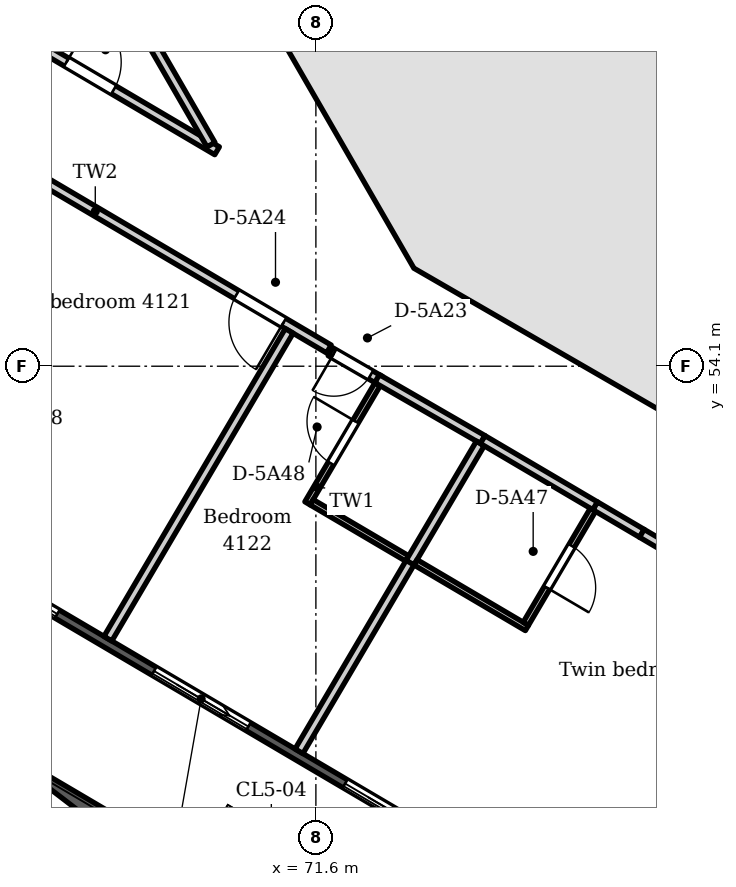
"""IFC4 building model, lengths in metres.
Left out: names, types, materials, properties, quantities, classifications, styles, units other than length and angle.
Written with IfcOpenShell. Run it as: python <this file> out.ifc"""

import sys

from ifc_helpers import new_model, si_unit, direction, frame, frame_2d, origin, place, context, subcontext, project, spatial, polyline, rectangle, outline, extrude, element, fill, save


model = new_model("IFC4")
c1 = context("Model", 3, precision=1e-05, world=origin(), true_north=direction((0.0, 1.0)))
c2 = subcontext(c1, "Body", "Model", "MODEL_VIEW")
j1 = project(units=[si_unit("LENGTHUNIT", "METRE"), si_unit("PLANEANGLEUNIT", "RADIAN")], contexts=[c1])
p1 = place(None, origin())
s1 = spatial("IfcSite", under=j1, at=p1, CompositionType="ELEMENT")
p2 = place(p1, origin())
s2 = spatial("IfcBuilding", under=s1, at=p2, CompositionType="ELEMENT")
p3 = place(p2, frame((0.0, 0.0, 161.1)))
s3 = spatial("IfcBuildingStorey", under=s2, at=p3, CompositionType="ELEMENT", Elevation=161.1)
p4 = place(p3, frame((71.117, 60.24, 0.0), z_axis=(0.0, 0.0, 1.0), x_axis=(0.500038571144, -0.866003133579, 0.0)))
e1 = element("IfcWall", 1, at=p4, inside=s3, PredefinedType="SHEAR", context=c2, shape_type="SweptSolid", body=[
    extrude(outline(polyline([(0.0, -0.45), (4.969, -0.45), (4.728, 0.45), (0.241, 0.45), (0.0, -0.45)])), origin(), (0.0, 0.0, 1.0), 3.6),
])
p5 = place(p4, frame((1.785, 0.0, 0.0)))
e2 = element("IfcOpeningElement", 2, at=p5, cuts=e1, PredefinedType="OPENING", context=c2, shape_type="SweptSolid", body=[
    extrude(rectangle(XDim=1.4, YDim=2.1, at=frame_2d((0.7, 1.05))), frame((0.0, 0.46, 0.0), z_axis=(0.0, -1.0, 0.0), x_axis=(1.0, 0.0, 0.0)), (0.0, 0.0, 1.0), 0.92),
])
p6 = place(p3, frame((73.437, 56.102, 0.0), z_axis=(0.0, 0.0, 1.0), x_axis=(0.866003133579, -0.500038571144, 0.0)))
e3 = element("IfcWall", 3, at=p6, inside=s3, PredefinedType="SHEAR", context=c2, shape_type="SweptSolid", body=[
    extrude(outline(polyline([(0.0, -0.45), (4.969, -0.45), (4.728, 0.45), (0.241, 0.45), (0.0, -0.45)])), origin(), (0.0, 0.0, 1.0), 3.6),
])
p7 = place(p6, frame((0.896, 0.0, 0.0)))
e4 = element("IfcOpeningElement", 4, at=p7, cuts=e3, PredefinedType="OPENING", context=c2, shape_type="SweptSolid", body=[
    extrude(rectangle(XDim=0.9, YDim=2.1, at=frame_2d((0.45, 1.05))), frame((0.0, 0.46, 0.0), z_axis=(0.0, -1.0, 0.0), x_axis=(1.0, 0.0, 0.0)), (0.0, 0.0, 1.0), 0.92),
])
p8 = place(p6, frame((3.185, 0.0, 0.0)))
e5 = element("IfcOpeningElement", 5, at=p8, cuts=e3, PredefinedType="OPENING", context=c2, shape_type="SweptSolid", body=[
    extrude(rectangle(XDim=0.9, YDim=2.1, at=frame_2d((0.45, 1.05))), frame((0.0, 0.46, 0.0), z_axis=(0.0, -1.0, 0.0), x_axis=(1.0, 0.0, 0.0)), (0.0, 0.0, 1.0), 0.92),
])
p9 = place(p3, frame((80.354, 60.886, 0.0), z_axis=(0.0, 0.0, 1.0), x_axis=(-0.866047706748, -0.499961368145, 0.0)))
e6 = element("IfcWall", 6, at=p9, inside=s3, PredefinedType="SHEAR", context=c2, shape_type="SweptSolid", body=[
    extrude(rectangle(XDim=7.873, YDim=0.3, at=frame_2d((3.936, 0.0))), origin(), (0.0, 0.0, 1.0), 3.6),
])
p10 = place(p3, frame((90.139, 36.597, 0.0), z_axis=(0.0, 0.0, 1.0), x_axis=(-0.861630336939, 0.507536365659, 0.0)))
e7 = element("IfcWall", 7, at=p10, inside=s3, PredefinedType="SOLIDWALL", context=c2, shape_type="SweptSolid", body=[
    extrude(outline(polyline([(0.149, 0.075), (0.149, -0.075), (43.617, -0.075), (43.617, 0.075), (0.149, 0.075)])), origin(), (0.0, 0.0, 1.0), 3.3),
])
p11 = place(p10, frame((1.224, 0.0, 0.0)))
e8 = element("IfcOpeningElement", 8, at=p11, cuts=e7, PredefinedType="OPENING", context=c2, shape_type="SweptSolid", body=[
    extrude(rectangle(XDim=1.8, YDim=2.6, at=frame_2d((0.9, 1.3))), frame((0.0, 0.085, 0.0), z_axis=(0.0, -1.0, 0.0), x_axis=(1.0, 0.0, 0.0)), (0.0, 0.0, 1.0), 0.17),
])
p12 = place(p10, frame((4.571, 0.0, 0.0)))
e9 = element("IfcOpeningElement", 9, at=p12, cuts=e7, PredefinedType="OPENING", context=c2, shape_type="SweptSolid", body=[
    extrude(rectangle(XDim=1.8, YDim=2.6, at=frame_2d((0.9, 1.3))), frame((0.0, 0.085, 0.0), z_axis=(0.0, -1.0, 0.0), x_axis=(1.0, 0.0, 0.0)), (0.0, 0.0, 1.0), 0.17),
])
p13 = place(p10, frame((8.218, 0.0, 0.0)))
e10 = element("IfcOpeningElement", 10, at=p13, cuts=e7, PredefinedType="OPENING", context=c2, shape_type="SweptSolid", body=[
    extrude(rectangle(XDim=1.8, YDim=2.6, at=frame_2d((0.9, 1.3))), frame((0.0, 0.085, 0.0), z_axis=(0.0, -1.0, 0.0), x_axis=(1.0, 0.0, 0.0)), (0.0, 0.0, 1.0), 0.17),
])
p14 = place(p10, frame((11.865, 0.0, 0.0)))
e11 = element("IfcOpeningElement", 11, at=p14, cuts=e7, PredefinedType="OPENING", context=c2, shape_type="SweptSolid", body=[
    extrude(rectangle(XDim=1.8, YDim=2.6, at=frame_2d((0.9, 1.3))), frame((0.0, 0.085, 0.0), z_axis=(0.0, -1.0, 0.0), x_axis=(1.0, 0.0, 0.0)), (0.0, 0.0, 1.0), 0.17),
])
p15 = place(p10, frame((15.512, 0.0, 0.0)))
e12 = element("IfcOpeningElement", 12, at=p15, cuts=e7, PredefinedType="OPENING", context=c2, shape_type="SweptSolid", body=[
    extrude(rectangle(XDim=1.8, YDim=2.6, at=frame_2d((0.9, 1.3))), frame((0.0, 0.085, 0.0), z_axis=(0.0, -1.0, 0.0), x_axis=(1.0, 0.0, 0.0)), (0.0, 0.0, 1.0), 0.17),
])
p16 = place(p10, frame((19.16, 0.0, 0.0)))
e13 = element("IfcOpeningElement", 13, at=p16, cuts=e7, PredefinedType="OPENING", context=c2, shape_type="SweptSolid", body=[
    extrude(rectangle(XDim=1.8, YDim=2.6, at=frame_2d((0.9, 1.3))), frame((0.0, 0.085, 0.0), z_axis=(0.0, -1.0, 0.0), x_axis=(1.0, 0.0, 0.0)), (0.0, 0.0, 1.0), 0.17),
])
p17 = place(p10, frame((22.807, 0.0, 0.0)))
e14 = element("IfcOpeningElement", 14, at=p17, cuts=e7, PredefinedType="OPENING", context=c2, shape_type="SweptSolid", body=[
    extrude(rectangle(XDim=1.8, YDim=2.6, at=frame_2d((0.9, 1.3))), frame((0.0, 0.085, 0.0), z_axis=(0.0, -1.0, 0.0), x_axis=(1.0, 0.0, 0.0)), (0.0, 0.0, 1.0), 0.17),
])
p18 = place(p10, frame((26.454, 0.0, 0.0)))
e15 = element("IfcOpeningElement", 15, at=p18, cuts=e7, PredefinedType="OPENING", context=c2, shape_type="SweptSolid", body=[
    extrude(rectangle(XDim=1.8, YDim=2.6, at=frame_2d((0.9, 1.3))), frame((0.0, 0.085, 0.0), z_axis=(0.0, -1.0, 0.0), x_axis=(1.0, 0.0, 0.0)), (0.0, 0.0, 1.0), 0.17),
])
p19 = place(p10, frame((30.101, 0.0, 0.0)))
e16 = element("IfcOpeningElement", 16, at=p19, cuts=e7, PredefinedType="OPENING", context=c2, shape_type="SweptSolid", body=[
    extrude(rectangle(XDim=1.8, YDim=2.6, at=frame_2d((0.9, 1.3))), frame((0.0, 0.085, 0.0), z_axis=(0.0, -1.0, 0.0), x_axis=(1.0, 0.0, 0.0)), (0.0, 0.0, 1.0), 0.17),
])
p20 = place(p10, frame((33.748, 0.0, 0.0)))
e17 = element("IfcOpeningElement", 17, at=p20, cuts=e7, PredefinedType="OPENING", context=c2, shape_type="SweptSolid", body=[
    extrude(rectangle(XDim=1.8, YDim=2.6, at=frame_2d((0.9, 1.3))), frame((0.0, 0.085, 0.0), z_axis=(0.0, -1.0, 0.0), x_axis=(1.0, 0.0, 0.0)), (0.0, 0.0, 1.0), 0.17),
])
p21 = place(p10, frame((37.396, 0.0, 0.0)))
e18 = element("IfcOpeningElement", 18, at=p21, cuts=e7, PredefinedType="OPENING", context=c2, shape_type="SweptSolid", body=[
    extrude(rectangle(XDim=1.8, YDim=2.6, at=frame_2d((0.9, 1.3))), frame((0.0, 0.085, 0.0), z_axis=(0.0, -1.0, 0.0), x_axis=(1.0, 0.0, 0.0)), (0.0, 0.0, 1.0), 0.17),
])
p22 = place(p10, frame((40.743, 0.0, 0.0)))
e19 = element("IfcOpeningElement", 19, at=p22, cuts=e7, PredefinedType="OPENING", context=c2, shape_type="SweptSolid", body=[
    extrude(rectangle(XDim=1.8, YDim=2.6, at=frame_2d((0.9, 1.3))), frame((0.0, 0.085, 0.0), z_axis=(0.0, -1.0, 0.0), x_axis=(1.0, 0.0, 0.0)), (0.0, 0.0, 1.0), 0.17),
])
p23 = place(p3, origin())
e20 = element("IfcWall", 20, at=p23, inside=s3, PredefinedType="PARAPET", context=c2, shape_type="SweptSolid", body=[
    extrude(outline(polyline([(66.115, 48.004), (89.775, 29.849), (89.82, 30.192), (68.236, 46.754), (66.115, 48.004)])), origin(), (0.0, 0.0, 1.0), 1.1),
])
p24 = place(p3, frame((65.779, 57.938, 0.0), z_axis=(0.0, 0.0, 1.0), x_axis=(0.861623120435, -0.507548616718, 0.0)))
e21 = element("IfcWall", 21, at=p24, inside=s3, PredefinedType="PARTITIONING", context=c2, shape_type="SweptSolid", body=[
    extrude(rectangle(XDim=7.004, YDim=0.15, at=frame_2d((3.502, 0.0))), origin(), (0.0, 0.0, 1.0), 3.3),
])
p25 = place(p24, frame((5.24, 0.0, 0.0)))
e22 = element("IfcOpeningElement", 22, at=p25, cuts=e21, PredefinedType="OPENING", context=c2, shape_type="SweptSolid", body=[
    extrude(rectangle(XDim=0.9, YDim=2.1, at=frame_2d((0.45, 1.05))), frame((0.0, 0.085, 0.0), z_axis=(0.0, -1.0, 0.0), x_axis=(1.0, 0.0, 0.0)), (0.0, 0.0, 1.0), 0.17),
])
p26 = place(p3, frame((65.863, 60.065, 0.0), z_axis=(0.0, 0.0, 1.0), x_axis=(0.861635540959, -0.507527530835, 0.0)))
e23 = element("IfcWall", 23, at=p26, inside=s3, PredefinedType="PARTITIONING", context=c2, shape_type="SweptSolid", body=[
    extrude(rectangle(XDim=4.772, YDim=0.15, at=frame_2d((2.386, 0.0))), origin(), (0.0, 0.0, 1.0), 3.3),
])
p27 = place(p26, frame((1.899, 0.0, 0.0)))
e24 = element("IfcOpeningElement", 24, at=p27, cuts=e23, PredefinedType="OPENING", context=c2, shape_type="SweptSolid", body=[
    extrude(rectangle(XDim=0.9, YDim=2.1, at=frame_2d((0.45, 1.05))), frame((0.0, 0.085, 0.0), z_axis=(0.0, -1.0, 0.0), x_axis=(1.0, 0.0, 0.0)), (0.0, 0.0, 1.0), 0.17),
])
p28 = place(p3, frame((68.179, 49.619, 0.0), z_axis=(0.0, 0.0, 1.0), x_axis=(0.507603061138, 0.861591047031, 0.0)))
e25 = element("IfcWall", 25, at=p28, inside=s3, PredefinedType="PARTITIONING", context=c2, shape_type="SweptSolid", body=[
    extrude(rectangle(XDim=5.874, YDim=0.15, at=frame_2d((2.937, 0.0))), origin(), (0.0, 0.0, 1.0), 3.3),
])
p29 = place(p3, frame((68.889, 59.448, 0.0), z_axis=(0.0, 0.0, 1.0), x_axis=(0.500259007655, -0.865875813994, 0.0)))
e26 = element("IfcWall", 26, at=p29, inside=s3, PredefinedType="PARTITIONING", context=c2, shape_type="SweptSolid", body=[
    extrude(rectangle(XDim=1.969, YDim=0.15, at=frame_2d((0.985, 0.0))), origin(), (0.0, 0.0, 1.0), 3.3),
])
p30 = place(p3, frame((71.322, 47.769, 0.0), z_axis=(0.0, 0.0, 1.0), x_axis=(0.507419363551, 0.861699245383, 0.0)))
e27 = element("IfcWall", 27, at=p30, inside=s3, PredefinedType="PARTITIONING", context=c2, shape_type="SweptSolid", body=[
    extrude(rectangle(XDim=3.688, YDim=0.15, at=frame_2d((1.844, 0.0))), origin(), (0.0, 0.0, 1.0), 3.3),
])
p31 = place(p3, frame((71.462, 51.846, 0.0), z_axis=(0.0, 0.0, 1.0), x_axis=(0.507433164297, 0.861691118541, 0.0)))
e28 = element("IfcWall", 28, at=p31, inside=s3, PredefinedType="PARTITIONING", context=c2, shape_type="SweptSolid", body=[
    extrude(rectangle(XDim=2.273, YDim=0.1, at=frame_2d((1.136, 0.0))), origin(), (0.0, 0.0, 1.0), 3.3),
])
p32 = place(p31, frame((0.761, 0.0, 0.0)))
e29 = element("IfcOpeningElement", 29, at=p32, cuts=e28, PredefinedType="OPENING", context=c2, shape_type="SweptSolid", body=[
    extrude(rectangle(XDim=0.8, YDim=2.1, at=frame_2d((0.4, 1.05))), frame((0.0, 0.06, 0.0), z_axis=(0.0, -1.0, 0.0), x_axis=(1.0, 0.0, 0.0)), (0.0, 0.0, 1.0), 0.12),
])
p33 = place(p3, frame((71.53, 51.864, 0.0), z_axis=(0.0, 0.0, 1.0), x_axis=(0.861772491813, -0.507294955972, 0.0)))
e30 = element("IfcWall", 30, at=p33, inside=s3, PredefinedType="PARTITIONING", context=c2, shape_type="SweptSolid", body=[
    extrude(rectangle(XDim=1.824, YDim=0.1, at=frame_2d((0.912, 0.0))), origin(), (0.0, 0.0, 1.0), 3.3),
])
p34 = place(p3, frame((71.839, 54.339, 0.0), z_axis=(0.0, 0.0, 1.0), x_axis=(0.865780375256, -0.500424161908, 0.0)))
e31 = element("IfcWall", 31, at=p34, inside=s3, PredefinedType="PARTITIONING", context=c2, shape_type="SweptSolid", body=[
    extrude(rectangle(XDim=0.944, YDim=0.15, at=frame_2d((0.472, 0.0))), origin(), (0.0, 0.0, 1.0), 3.3),
])
p35 = place(p34, frame((0.064, 0.0, 0.0)))
e32 = element("IfcOpeningElement", 32, at=p35, cuts=e31, PredefinedType="OPENING", context=c2, shape_type="SweptSolid", body=[
    extrude(rectangle(XDim=0.7, YDim=2.1, at=frame_2d((0.35, 1.05))), frame((0.0, 0.085, 0.0), z_axis=(0.0, -1.0, 0.0), x_axis=(1.0, 0.0, 0.0)), (0.0, 0.0, 1.0), 0.17),
])
p36 = place(p3, frame((72.607, 53.896, 0.0), z_axis=(0.0, 0.0, 1.0), x_axis=(0.866136921896, -0.4998067952, 0.0)))
e33 = element("IfcWall", 33, at=p36, inside=s3, PredefinedType="PARTITIONING", context=c2, shape_type="SweptSolid", body=[
    extrude(rectangle(XDim=2.005, YDim=0.15, at=frame_2d((1.002, 0.0))), origin(), (0.0, 0.0, 1.0), 3.3),
])
p37 = place(p3, frame((73.149, 50.87, 0.0), z_axis=(0.0, 0.0, 1.0), x_axis=(0.507882922516, 0.861426106533, 0.0)))
e34 = element("IfcWall", 34, at=p37, inside=s3, PredefinedType="PARTITIONING", context=c2, shape_type="SweptSolid", body=[
    extrude(rectangle(XDim=2.275, YDim=0.15, at=frame_2d((1.137, 0.0))), origin(), (0.0, 0.0, 1.0), 3.3),
])
p38 = place(p3, frame((73.239, 50.875, 0.0), z_axis=(0.0, 0.0, 1.0), x_axis=(0.861529491654, -0.507707529006, 0.0)))
e35 = element("IfcWall", 35, at=p38, inside=s3, PredefinedType="PARTITIONING", context=c2, shape_type="SweptSolid", body=[
    extrude(rectangle(XDim=2.126, YDim=0.1, at=frame_2d((1.063, 0.0))), origin(), (0.0, 0.0, 1.0), 3.3),
])
p39 = place(p3, frame((74.343, 52.893, 0.0), z_axis=(0.0, 0.0, 1.0), x_axis=(0.861685778752, -0.507442231882, 0.0)))
e36 = element("IfcWall", 36, at=p39, inside=s3, PredefinedType="PARTITIONING", context=c2, shape_type="SweptSolid", body=[
    extrude(rectangle(XDim=2.148, YDim=0.15, at=frame_2d((1.074, 0.0))), origin(), (0.0, 0.0, 1.0), 3.3),
])
p40 = place(p3, frame((75.052, 49.864, 0.0), z_axis=(0.0, 0.0, 1.0), x_axis=(0.507363468798, 0.861732157071, 0.0)))
e37 = element("IfcWall", 37, at=p40, inside=s3, PredefinedType="PARTITIONING", context=c2, shape_type="SweptSolid", body=[
    extrude(rectangle(XDim=2.175, YDim=0.1, at=frame_2d((1.087, 0.0))), origin(), (0.0, 0.0, 1.0), 3.3),
])
p41 = place(p40, frame((0.688, 0.0, 0.0)))
e38 = element("IfcOpeningElement", 38, at=p41, cuts=e37, PredefinedType="OPENING", context=c2, shape_type="SweptSolid", body=[
    extrude(rectangle(XDim=0.8, YDim=2.1, at=frame_2d((0.4, 1.05))), frame((0.0, 0.06, 0.0), z_axis=(0.0, -1.0, 0.0), x_axis=(1.0, 0.0, 0.0)), (0.0, 0.0, 1.0), 0.12),
])
p42 = place(p3, frame((76.194, 51.803, 0.0), z_axis=(0.0, 0.0, 1.0), x_axis=(0.861814436452, -0.507223695349, 0.0)))
e39 = element("IfcWall", 39, at=p42, inside=s3, PredefinedType="PARTITIONING", context=c2, shape_type="SweptSolid", body=[
    extrude(rectangle(XDim=0.891, YDim=0.15, at=frame_2d((0.445, 0.0))), origin(), (0.0, 0.0, 1.0), 3.3),
])
p43 = place(p3, frame((76.96, 51.352, 0.0), z_axis=(0.0, 0.0, 1.0), x_axis=(0.861634811964, -0.507528768457, 0.0)))
e40 = element("IfcWall", 40, at=p43, inside=s3, PredefinedType="PARTITIONING", context=c2, shape_type="SweptSolid", body=[
    extrude(rectangle(XDim=5.956, YDim=0.15, at=frame_2d((2.978, 0.0))), origin(), (0.0, 0.0, 1.0), 3.3),
])
p44 = place(p43, frame((4.406, 0.0, 0.0)))
e41 = element("IfcOpeningElement", 41, at=p44, cuts=e40, PredefinedType="OPENING", context=c2, shape_type="SweptSolid", body=[
    extrude(rectangle(XDim=0.9, YDim=2.1, at=frame_2d((0.45, 1.05))), frame((0.0, 0.085, 0.0), z_axis=(0.0, -1.0, 0.0), x_axis=(1.0, 0.0, 0.0)), (0.0, 0.0, 1.0), 0.17),
])
p45 = place(p43, frame((3.206, 0.0, 0.0)))
e42 = element("IfcOpeningElement", 42, at=p45, cuts=e40, PredefinedType="OPENING", context=c2, shape_type="SweptSolid", body=[
    extrude(rectangle(XDim=0.9, YDim=2.1, at=frame_2d((0.45, 1.05))), frame((0.0, 0.085, 0.0), z_axis=(0.0, -1.0, 0.0), x_axis=(1.0, 0.0, 0.0)), (0.0, 0.0, 1.0), 0.17),
])
p46 = place(p3, frame((75.814, 55.249, 0.0), z_axis=(0.0, 0.0, 1.0), x_axis=(0.499890179513, 0.866088799389, 0.0)))
e43 = element("IfcWall", 43, at=p46, inside=s3, PredefinedType="PARTITIONING", context=c2, shape_type="SweptSolid", body=[
    extrude(rectangle(XDim=0.882, YDim=0.15, at=frame_2d((0.441, 0.0))), origin(), (0.0, 0.0, 1.0), 3.3),
])
p47 = place(p3, frame((76.2, 58.257, 0.0), z_axis=(0.0, 0.0, 1.0), x_axis=(0.0, -1.0, 0.0)))
e44 = element("IfcWall", 44, at=p47, inside=s3, PredefinedType="PARTITIONING", context=c2, shape_type="SweptSolid", body=[
    extrude(rectangle(XDim=2.207, YDim=0.2, at=frame_2d((1.104, 0.0))), origin(), (0.0, 0.0, 1.0), 3.3),
])
p48 = place(p3, frame((78.7, 56.15, 0.0), z_axis=(0.0, 0.0, 1.0), x_axis=(-1.0, 0.0, 0.0)))
e45 = element("IfcWall", 45, at=p48, inside=s3, PredefinedType="PARTITIONING", context=c2, shape_type="SweptSolid", body=[
    extrude(rectangle(XDim=2.4, YDim=0.2, at=frame_2d((1.2, 0.0))), origin(), (0.0, 0.0, 1.0), 3.3),
])
p49 = place(p3, frame((78.7, 58.35, 0.0), z_axis=(0.0, 0.0, 1.0), x_axis=(-1.0, 0.0, 0.0)))
e46 = element("IfcWall", 46, at=p49, inside=s3, PredefinedType="PARTITIONING", context=c2, shape_type="SweptSolid", body=[
    extrude(rectangle(XDim=2.265, YDim=0.2, at=frame_2d((1.132, 0.0))), origin(), (0.0, 0.0, 1.0), 3.3),
])
p50 = place(p16, origin())
e47 = element("IfcDoor", 47, at=p50, inside=s3, OperationType="SLIDING_TO_LEFT", PredefinedType="DOOR", context=c2, shape_type="SweptSolid", body=[
    extrude(rectangle(XDim=1.8, YDim=2.6, at=frame_2d((0.9, 1.3))), frame((0.0, 0.025, 0.0), z_axis=(0.0, -1.0, 0.0), x_axis=(1.0, 0.0, 0.0)), (0.0, 0.0, 1.0), 0.05),
])
fill(e13, e47)
p51 = place(p17, origin())
e48 = element("IfcDoor", 48, at=p51, inside=s3, OperationType="SLIDING_TO_LEFT", PredefinedType="DOOR", context=c2, shape_type="SweptSolid", body=[
    extrude(rectangle(XDim=1.8, YDim=2.6, at=frame_2d((0.9, 1.3))), frame((0.0, 0.025, 0.0), z_axis=(0.0, -1.0, 0.0), x_axis=(1.0, 0.0, 0.0)), (0.0, 0.0, 1.0), 0.05),
])
fill(e14, e48)
p52 = place(p18, origin())
e49 = element("IfcDoor", 49, at=p52, inside=s3, OperationType="SLIDING_TO_LEFT", PredefinedType="DOOR", context=c2, shape_type="SweptSolid", body=[
    extrude(rectangle(XDim=1.8, YDim=2.6, at=frame_2d((0.9, 1.3))), frame((0.0, 0.025, 0.0), z_axis=(0.0, -1.0, 0.0), x_axis=(1.0, 0.0, 0.0)), (0.0, 0.0, 1.0), 0.05),
])
fill(e15, e49)
p53 = place(p35, frame((0.7, 0.0, 0.0), z_axis=(0.0, 0.0, 1.0), x_axis=(-1.0, 0.0, 0.0)))
e50 = element("IfcDoor", 50, at=p53, inside=s3, OperationType="SINGLE_SWING_RIGHT", PredefinedType="DOOR", context=c2, shape_type="SweptSolid", body=[
    extrude(rectangle(XDim=0.7, YDim=2.1, at=frame_2d((0.35, 1.05))), frame((0.0, 0.025, 0.0), z_axis=(0.0, -1.0, 0.0), x_axis=(1.0, 0.0, 0.0)), (0.0, 0.0, 1.0), 0.05),
])
fill(e32, e50)
p54 = place(p25, frame((0.9, 0.0, 0.0), z_axis=(0.0, 0.0, 1.0), x_axis=(-1.0, 0.0, 0.0)))
e51 = element("IfcDoor", 51, at=p54, inside=s3, OperationType="SINGLE_SWING_LEFT", PredefinedType="DOOR", context=c2, shape_type="SweptSolid", body=[
    extrude(rectangle(XDim=0.9, YDim=2.1, at=frame_2d((0.45, 1.05))), frame((0.0, 0.025, 0.0), z_axis=(0.0, -1.0, 0.0), x_axis=(1.0, 0.0, 0.0)), (0.0, 0.0, 1.0), 0.05),
])
fill(e22, e51)
p55 = place(p27, origin())
e52 = element("IfcDoor", 52, at=p55, inside=s3, OperationType="SINGLE_SWING_LEFT", PredefinedType="DOOR", context=c2, shape_type="SweptSolid", body=[
    extrude(rectangle(XDim=0.9, YDim=2.1, at=frame_2d((0.45, 1.05))), frame((0.0, 0.025, 0.0), z_axis=(0.0, -1.0, 0.0), x_axis=(1.0, 0.0, 0.0)), (0.0, 0.0, 1.0), 0.05),
])
fill(e24, e52)
p56 = place(p41, frame((0.8, 0.0, 0.0), z_axis=(0.0, 0.0, 1.0), x_axis=(-1.0, 0.0, 0.0)))
e53 = element("IfcDoor", 53, at=p56, inside=s3, OperationType="SINGLE_SWING_RIGHT", PredefinedType="DOOR", context=c2, shape_type="SweptSolid", body=[
    extrude(rectangle(XDim=0.8, YDim=2.1, at=frame_2d((0.4, 1.05))), frame((0.0, 0.025, 0.0), z_axis=(0.0, -1.0, 0.0), x_axis=(1.0, 0.0, 0.0)), (0.0, 0.0, 1.0), 0.05),
])
fill(e38, e53)
p57 = place(p32, origin())
e54 = element("IfcDoor", 54, at=p57, inside=s3, OperationType="SINGLE_SWING_RIGHT", PredefinedType="DOOR", context=c2, shape_type="SweptSolid", body=[
    extrude(rectangle(XDim=0.8, YDim=2.1, at=frame_2d((0.4, 1.05))), frame((0.0, 0.025, 0.0), z_axis=(0.0, -1.0, 0.0), x_axis=(1.0, 0.0, 0.0)), (0.0, 0.0, 1.0), 0.05),
])
fill(e29, e54)
p58 = place(p5, origin())
e55 = element("IfcDoor", 55, at=p58, inside=s3, OperationType="DOUBLE_DOOR_SINGLE_SWING", PredefinedType="DOOR", context=c2, shape_type="SweptSolid", body=[
    extrude(rectangle(XDim=1.4, YDim=2.1, at=frame_2d((0.7, 1.05))), frame((0.0, 0.025, 0.0), z_axis=(0.0, -1.0, 0.0), x_axis=(1.0, 0.0, 0.0)), (0.0, 0.0, 1.0), 0.05),
])
fill(e2, e55)
p59 = place(p7, origin())
e56 = element("IfcDoor", 56, at=p59, inside=s3, OperationType="SINGLE_SWING_LEFT", PredefinedType="DOOR", context=c2, shape_type="SweptSolid", body=[
    extrude(rectangle(XDim=0.9, YDim=2.1, at=frame_2d((0.45, 1.05))), frame((0.0, 0.175, 0.0), z_axis=(0.0, -1.0, 0.0), x_axis=(1.0, 0.0, 0.0)), (0.0, 0.0, 1.0), 0.05),
])
fill(e4, e56)
p60 = place(p8, origin())
e57 = element("IfcDoor", 57, at=p60, inside=s3, OperationType="SINGLE_SWING_RIGHT", PredefinedType="DOOR", context=c2, shape_type="SweptSolid", body=[
    extrude(rectangle(XDim=0.9, YDim=2.1, at=frame_2d((0.45, 1.05))), frame((0.0, 0.175, 0.0), z_axis=(0.0, -1.0, 0.0), x_axis=(1.0, 0.0, 0.0)), (0.0, 0.0, 1.0), 0.05),
])
fill(e5, e57)
save(model, sys.argv[1])
